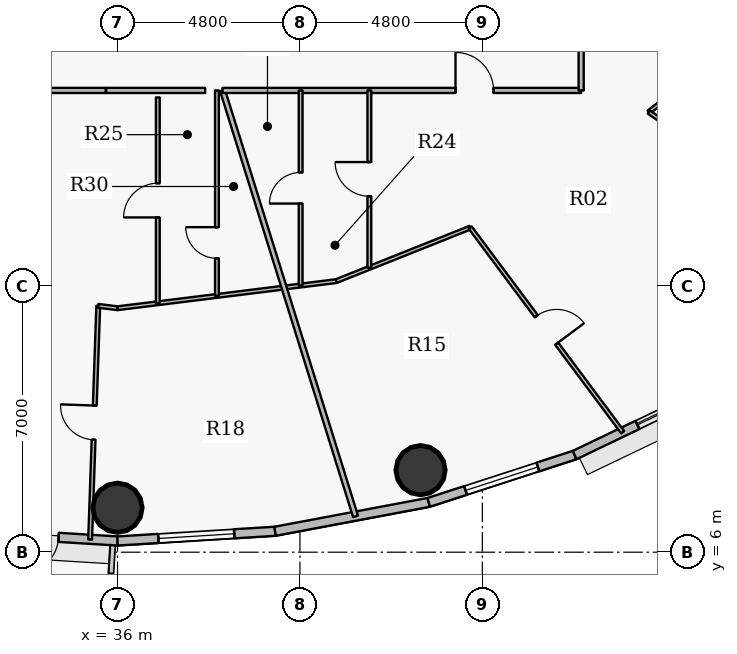
"""IFC4 building model, lengths in metres.
Left out: names, types, materials, properties, quantities, classifications, styles, units other than length and angle.
Written with IfcOpenShell. Run it as: python <this file> out.ifc"""

import sys

from ifc_helpers import new_model, si_unit, direction, frame, frame_2d, origin, origin_2d, place, context, subcontext, project, spatial, rectangle, hollow_circle, extrude, source, transform, mapped, element, fill, save


model = new_model("IFC4")
c1 = context("Model", 3, precision=1e-05, world=origin(), true_north=direction((0.0, 1.0)))
c2 = subcontext(c1, "Body", "Model", "MODEL_VIEW")
j1 = project(units=[si_unit("LENGTHUNIT", "METRE"), si_unit("PLANEANGLEUNIT", "RADIAN")], contexts=[c1])
p1 = place(None, origin())
s1 = spatial("IfcSite", under=j1, at=p1, CompositionType="ELEMENT")
p2 = place(p1, origin())
s2 = spatial("IfcBuilding", under=s1, at=p2, CompositionType="ELEMENT")
p3 = place(p2, frame((0.0, 0.0, 178.65)))
s3 = spatial("IfcBuildingStorey", under=s2, at=p3, CompositionType="ELEMENT", Elevation=178.65)
for number, where, z_axis, x_axis in (
    (1, (36.0, 7.17, 0.0), (0.0, 0.0, 1.0), (1.0, 0.0, 0.0)),
    (2, (43.973, 8.159, 0.0), (0.0, 0.0, 1.0), (1.0, 0.0, 0.0)),
):
    element("IfcColumn", number, at=place(p3, frame(where, z_axis=z_axis, x_axis=x_axis)), inside=s3, PredefinedType="COLUMN", context=c2, shape_type="SweptSolid", body=[
        extrude(hollow_circle(Radius=0.65, WallThickness=0.04, at=origin_2d()), origin(), (0.0, 0.0, 1.0), 3.75),
    ])
p4 = place(p3, frame((36.0, 6.295, 0.0), z_axis=(0.0, 0.0, 1.0), x_axis=(-0.998104600619, 0.061540281305, 0.0)))
e3 = element("IfcWall", 3, at=p4, inside=s3, PredefinedType="SOLIDWALL", context=c2, shape_type="SweptSolid", body=[
    extrude(rectangle(XDim=4.154, YDim=0.24, at=frame_2d((2.077, 0.0))), origin(), (0.0, 0.0, 1.0), 3.5),
])
p5 = place(p4, frame((1.552, 0.0, 0.0)))
e4 = element("IfcOpeningElement", 4, at=p5, cuts=e3, PredefinedType="OPENING", context=c2, shape_type="SweptSolid", body=[
    extrude(rectangle(XDim=1.05, YDim=2.15, at=origin_2d()), frame((0.525, 0.13, 1.075), z_axis=(0.0, -1.0, 0.0), x_axis=(1.0, 0.0, 0.0)), (0.0, 0.0, 1.0), 0.26),
])
p6 = place(p3, frame((40.146, 6.551, 0.0), z_axis=(0.0, 0.0, 1.0), x_axis=(-0.998104600619, -0.061540281305, 0.0)))
e5 = element("IfcWall", 5, at=p6, inside=s3, PredefinedType="SOLIDWALL", context=c2, shape_type="SweptSolid", body=[
    extrude(rectangle(XDim=4.154, YDim=0.24, at=frame_2d((2.077, 0.0))), origin(), (0.0, 0.0, 1.0), 3.5),
])
p7 = place(p6, frame((1.077, 0.0, 0.9)))
e6 = element("IfcOpeningElement", 6, at=p7, cuts=e5, PredefinedType="OPENING", context=c2, shape_type="SweptSolid", body=[
    extrude(rectangle(XDim=2.0, YDim=1.75, at=origin_2d()), frame((1.0, 0.13, 0.875), z_axis=(0.0, -1.0, 0.0), x_axis=(1.0, 0.0, 0.0)), (0.0, 0.0, 1.0), 0.26),
])
p8 = place(p3, frame((44.189, 7.311, 0.0), z_axis=(0.0, 0.0, 1.0), x_axis=(-0.982788108205, -0.184736391573, 0.0)))
e7 = element("IfcWall", 7, at=p8, inside=s3, PredefinedType="SOLIDWALL", context=c2, shape_type="SweptSolid", body=[
    extrude(rectangle(XDim=4.114, YDim=0.24, at=frame_2d((2.057, 0.0))), origin(), (0.0, 0.0, 1.0), 3.5),
])
p9 = place(p3, frame((48.03, 8.556, 0.0), z_axis=(0.0, 0.0, 1.0), x_axis=(-0.951209870236, -0.30854462038, 0.0)))
e8 = element("IfcWall", 8, at=p9, inside=s3, PredefinedType="SOLIDWALL", context=c2, shape_type="SweptSolid", body=[
    extrude(rectangle(XDim=4.038, YDim=0.24, at=frame_2d((2.019, 0.0))), origin(), (0.0, 0.0, 1.0), 3.5),
])
p10 = place(p9, frame((1.019, 0.0, 0.9)))
e9 = element("IfcOpeningElement", 9, at=p10, cuts=e8, PredefinedType="OPENING", context=c2, shape_type="SweptSolid", body=[
    extrude(rectangle(XDim=2.0, YDim=1.75, at=origin_2d()), frame((1.0, 0.13, 0.875), z_axis=(0.0, -1.0, 0.0), x_axis=(1.0, 0.0, 0.0)), (0.0, 0.0, 1.0), 0.26),
])
p11 = place(p3, frame((51.573, 10.257, 0.0), z_axis=(0.0, 0.0, 1.0), x_axis=(-0.901564733809, -0.432644231155, 0.0)))
e10 = element("IfcWall", 10, at=p11, inside=s3, PredefinedType="SOLIDWALL", context=c2, shape_type="SweptSolid", body=[
    extrude(rectangle(XDim=3.93, YDim=0.24, at=frame_2d((1.965, 0.0))), origin(), (0.0, 0.0, 1.0), 3.5),
])
p12 = place(p11, frame((0.848, 0.0, 0.9)))
e11 = element("IfcOpeningElement", 11, at=p12, cuts=e10, PredefinedType="OPENING", context=c2, shape_type="SweptSolid", body=[
    extrude(rectangle(XDim=1.25, YDim=1.65, at=origin_2d()), frame((0.625, 0.13, 0.825), z_axis=(0.0, -1.0, 0.0), x_axis=(1.0, 0.0, 0.0)), (0.0, 0.0, 1.0), 0.26),
])
p13 = place(p3, frame((24.35, 18.15, 0.0), z_axis=(0.0, 0.0, 1.0), x_axis=(1.0, 0.0, 0.0)))
e12 = element("IfcWall", 12, at=p13, inside=s3, PredefinedType="PARTITIONING", context=c2, shape_type="SweptSolid", body=[
    extrude(rectangle(XDim=11.341, YDim=0.135, at=frame_2d((5.67, 0.0))), origin(), (0.0, 0.0, 1.0), 2.935),
])
p14 = place(p13, frame((7.171, 0.0, 0.0)))
e13 = element("IfcOpeningElement", 13, at=p14, cuts=e12, PredefinedType="OPENING", context=c2, shape_type="SweptSolid", body=[
    extrude(rectangle(XDim=1.0, YDim=2.15, at=origin_2d()), frame((0.5, 0.078, 1.075), z_axis=(0.0, -1.0, 0.0), x_axis=(1.0, 0.0, 0.0)), (0.0, 0.0, 1.0), 0.155),
])
p15 = place(p3, frame((35.278, 6.334, 0.0), z_axis=(0.0, 0.0, 1.0), x_axis=(0.034887406989, 0.999391249128, 0.0)))
e14 = element("IfcWall", 14, at=p15, inside=s3, PredefinedType="PARTITIONING", context=c2, shape_type="SweptSolid", body=[
    extrude(rectangle(XDim=6.151, YDim=0.1, at=frame_2d((3.076, 0.0))), origin(), (0.0, 0.0, 1.0), 2.935),
])
p16 = place(p15, frame((2.625, 0.0, 0.0)))
e15 = element("IfcOpeningElement", 15, at=p16, cuts=e14, PredefinedType="OPENING", context=c2, shape_type="SweptSolid", body=[
    extrude(rectangle(XDim=0.9, YDim=2.1, at=origin_2d()), frame((0.45, 0.06, 1.05), z_axis=(0.0, -1.0, 0.0), x_axis=(1.0, 0.0, 0.0)), (0.0, 0.0, 1.0), 0.12),
])
p17 = place(p3, frame((35.493, 12.482, 0.0), z_axis=(0.0, 0.0, 1.0), x_axis=(0.992373140554, -0.123270231229, 0.0)))
e16 = element("IfcWall", 16, at=p17, inside=s3, PredefinedType="PARTITIONING", context=c2, shape_type="SweptSolid", body=[
    extrude(rectangle(XDim=0.511, YDim=0.1, at=frame_2d((0.255, 0.0))), origin(), (0.0, 0.0, 1.0), 2.935),
])
p18 = place(p3, frame((36.0, 12.419, 0.0), z_axis=(0.0, 0.0, 1.0), x_axis=(0.992396615981, 0.123081097612, 0.0)))
e17 = element("IfcWall", 17, at=p18, inside=s3, PredefinedType="PARTITIONING", context=c2, shape_type="SweptSolid", body=[
    extrude(rectangle(XDim=5.798, YDim=0.1, at=frame_2d((2.899, 0.0))), origin(), (0.0, 0.0, 1.0), 2.935),
])
p19 = place(p3, frame((37.061, 12.551, 0.0), z_axis=(0.0, 0.0, 1.0), x_axis=(0.0, 1.0, 0.0)))
e18 = element("IfcWall", 18, at=p19, inside=s3, PredefinedType="PARTITIONING", context=c2, shape_type="SweptSolid", body=[
    extrude(rectangle(XDim=5.416, YDim=0.1, at=frame_2d((2.708, 0.0))), origin(), (0.0, 0.0, 1.0), 3.035),
])
p20 = place(p19, frame((2.258, 0.0, 0.0)))
e19 = element("IfcOpeningElement", 19, at=p20, cuts=e18, PredefinedType="OPENING", context=c2, shape_type="SweptSolid", body=[
    extrude(rectangle(XDim=0.9, YDim=2.1, at=origin_2d()), frame((0.45, 0.06, 1.05), z_axis=(0.0, -1.0, 0.0), x_axis=(1.0, 0.0, 0.0)), (0.0, 0.0, 1.0), 0.12),
])
p21 = place(p3, frame((38.616, 12.743, 0.0), z_axis=(0.0, 0.0, 1.0), x_axis=(0.0, 1.0, 0.0)))
e20 = element("IfcWall", 20, at=p21, inside=s3, PredefinedType="PARTITIONING", context=c2, shape_type="SweptSolid", body=[
    extrude(rectangle(XDim=5.406, YDim=0.1, at=frame_2d((2.703, 0.0))), origin(), (0.0, 0.0, 1.0), 3.035),
])
p22 = place(p21, frame((0.989, 0.0, 0.0)))
e21 = element("IfcOpeningElement", 21, at=p22, cuts=e20, PredefinedType="OPENING", context=c2, shape_type="SweptSolid", body=[
    extrude(rectangle(XDim=0.82, YDim=2.1, at=origin_2d()), frame((0.41, 0.06, 1.05), z_axis=(0.0, -1.0, 0.0), x_axis=(1.0, 0.0, 0.0)), (0.0, 0.0, 1.0), 0.12),
])
p23 = place(p3, frame((38.764, 18.15, 0.0), z_axis=(0.0, 0.0, 1.0), x_axis=(0.298084348379, -0.954539533624, 0.0)))
e22 = element("IfcWall", 22, at=p23, inside=s3, PredefinedType="PARTITIONING", context=c2, shape_type="SweptSolid", body=[
    extrude(rectangle(XDim=11.74, YDim=0.135, at=frame_2d((5.87, 0.0))), origin(), (0.0, 0.0, 1.0), 2.935),
])
p24 = place(p3, frame((38.764, 18.15, 0.0), z_axis=(0.0, 0.0, 1.0), x_axis=(1.0, 0.0, 0.0)))
e23 = element("IfcWall", 23, at=p24, inside=s3, PredefinedType="PARTITIONING", context=c2, shape_type="SweptSolid", body=[
    extrude(rectangle(XDim=9.436, YDim=0.135, at=frame_2d((4.718, 0.0))), origin(), (0.0, 0.0, 1.0), 2.935),
])
p25 = place(p24, frame((6.13, 0.0, 0.0)))
e24 = element("IfcOpeningElement", 24, at=p25, cuts=e23, PredefinedType="OPENING", context=c2, shape_type="SweptSolid", body=[
    extrude(rectangle(XDim=1.0, YDim=2.15, at=origin_2d()), frame((0.5, 0.078, 1.075), z_axis=(0.0, -1.0, 0.0), x_axis=(1.0, 0.0, 0.0)), (0.0, 0.0, 1.0), 0.155),
])
p26 = place(p3, frame((40.819, 13.017, 0.0), z_axis=(0.0, 0.0, 1.0), x_axis=(0.0, 1.0, 0.0)))
e25 = element("IfcWall", 25, at=p26, inside=s3, PredefinedType="PARTITIONING", context=c2, shape_type="SweptSolid", body=[
    extrude(rectangle(XDim=5.133, YDim=0.1, at=frame_2d((2.567, 0.0))), origin(), (0.0, 0.0, 1.0), 2.935),
])
p27 = place(p26, frame((2.157, 0.0, 0.0)))
e26 = element("IfcOpeningElement", 26, at=p27, cuts=e25, PredefinedType="OPENING", context=c2, shape_type="SweptSolid", body=[
    extrude(rectangle(XDim=0.82, YDim=2.1, at=origin_2d()), frame((0.41, 0.06, 1.05), z_axis=(0.0, -1.0, 0.0), x_axis=(1.0, 0.0, 0.0)), (0.0, 0.0, 1.0), 0.12),
])
p28 = place(p3, frame((41.754, 13.133, 0.0), z_axis=(0.0, 0.0, 1.0), x_axis=(0.928786664236, 0.370614803182, 0.0)))
e27 = element("IfcWall", 27, at=p28, inside=s3, PredefinedType="PARTITIONING", context=c2, shape_type="SweptSolid", body=[
    extrude(rectangle(XDim=3.798, YDim=0.1, at=frame_2d((1.899, 0.0))), origin(), (0.0, 0.0, 1.0), 2.935),
])
p29 = place(p3, frame((42.627, 13.481, 0.0), z_axis=(0.0, 0.0, 1.0), x_axis=(0.0, 1.0, 0.0)))
e28 = element("IfcWall", 28, at=p29, inside=s3, PredefinedType="PARTITIONING", context=c2, shape_type="SweptSolid", body=[
    extrude(rectangle(XDim=4.669, YDim=0.1, at=frame_2d((2.334, 0.0))), origin(), (0.0, 0.0, 1.0), 3.5),
])
p30 = place(p29, frame((1.885, 0.0, 0.0)))
e29 = element("IfcOpeningElement", 29, at=p30, cuts=e28, PredefinedType="OPENING", context=c2, shape_type="SweptSolid", body=[
    extrude(rectangle(XDim=0.9, YDim=2.1, at=origin_2d()), frame((0.45, 0.06, 1.05), z_axis=(0.0, -1.0, 0.0), x_axis=(1.0, 0.0, 0.0)), (0.0, 0.0, 1.0), 0.12),
])
p31 = place(p3, frame((45.282, 14.54, 0.0), z_axis=(0.0, 0.0, 1.0), x_axis=(0.597407497301, -0.801937829366, 0.0)))
e30 = element("IfcWall", 30, at=p31, inside=s3, PredefinedType="PARTITIONING", context=c2, shape_type="SweptSolid", body=[
    extrude(rectangle(XDim=6.713, YDim=0.1, at=frame_2d((3.356, 0.0))), origin(), (0.0, 0.0, 1.0), 2.935),
])
p32 = place(p31, frame((2.906, 0.0, 0.0)))
e31 = element("IfcOpeningElement", 31, at=p32, cuts=e30, PredefinedType="OPENING", context=c2, shape_type="SweptSolid", body=[
    extrude(rectangle(XDim=0.9, YDim=2.1, at=origin_2d()), frame((0.45, 0.06, 1.05), z_axis=(0.0, -1.0, 0.0), x_axis=(1.0, 0.0, 0.0)), (0.0, 0.0, 1.0), 0.12),
])
p33 = place(p3, frame((48.2, 18.15, 0.0), z_axis=(0.0, 0.0, 1.0), x_axis=(0.0, 1.0, 0.0)))
e32 = element("IfcWall", 32, at=p33, inside=s3, PredefinedType="PARTITIONING", context=c2, shape_type="SweptSolid", body=[
    extrude(rectangle(XDim=1.9, YDim=0.135, at=frame_2d((0.95, 0.0))), origin(), (0.0, 0.0, 1.0), 3.5),
])
p34 = place(p3, frame((49.979, 17.58, 0.0), z_axis=(0.0, 0.0, 1.0), x_axis=(0.787344176355, 0.6165137046, 0.0)))
e33 = element("IfcWall", 33, at=p34, inside=s3, PredefinedType="PARTITIONING", context=c2, shape_type="SweptSolid", body=[
    extrude(rectangle(XDim=1.378, YDim=0.1, at=frame_2d((0.689, 0.0))), origin(), (0.0, 0.0, 1.0), 3.5),
])
p35 = place(p3, frame((49.979, 17.58, 0.0), z_axis=(0.0, 0.0, 1.0), x_axis=(0.829313188428, -0.55878406876, 0.0)))
e34 = element("IfcWall", 34, at=p35, inside=s3, PredefinedType="PARTITIONING", context=c2, shape_type="SweptSolid", body=[
    extrude(rectangle(XDim=7.259, YDim=0.1, at=frame_2d((3.629, 0.0))), origin(), (0.0, 0.0, 1.0), 2.935),
])
p36 = place(p35, frame((3.179, 0.0, 0.0)))
e35 = element("IfcOpeningElement", 35, at=p36, cuts=e34, PredefinedType="OPENING", context=c2, shape_type="SweptSolid", body=[
    extrude(rectangle(XDim=0.9, YDim=2.1, at=origin_2d()), frame((0.45, 0.06, 1.05), z_axis=(0.0, -1.0, 0.0), x_axis=(1.0, 0.0, 0.0)), (0.0, 0.0, 1.0), 0.12),
])
p37 = place(p3, frame((38.306, 18.15, 0.0), z_axis=(0.0, 0.0, 1.0), x_axis=(-1.0, 0.0, 0.0)))
e36 = element("IfcWall", 36, at=p37, inside=s3, PredefinedType="PARTITIONING", context=c2, shape_type="SweptSolid", body=[
    extrude(rectangle(XDim=2.605, YDim=0.135, at=frame_2d((1.302, 0.0))), origin(), (0.0, 0.0, 1.0), 2.935),
])
m1 = source(origin(), c2, "Body", "SweptSolid", [
    extrude(rectangle(XDim=1.05, YDim=2.15, at=origin_2d()), frame((0.525, 0.025, 1.075), z_axis=(0.0, -1.0, 0.0), x_axis=(1.0, 0.0, 0.0)), (0.0, 0.0, 1.0), 0.05),
])
p38 = place(p5, origin())
e37 = element("IfcDoor", 37, at=p38, inside=s3, OperationType="SINGLE_SWING_RIGHT", PredefinedType="DOOR", context=c2, shape_type="MappedRepresentation", body=[
    mapped(m1, transform((0.0, 0.0, 0.0), x_axis=(1.0, 0.0, 0.0), y_axis=(0.0, 1.0, 0.0), z_axis=(0.0, 0.0, 1.0), scale=1.0)),
])
fill(e4, e37)
m2 = source(origin(), c2, "Body", "SweptSolid", [
    extrude(rectangle(XDim=2.0, YDim=1.75, at=origin_2d()), frame((1.0, 0.03, 0.875), z_axis=(0.0, -1.0, 0.0), x_axis=(1.0, 0.0, 0.0)), (0.0, 0.0, 1.0), 0.06),
])
p39 = place(p7, origin())
e38 = element("IfcWindow", 38, at=p39, inside=s3, PartitioningType="DOUBLE_PANEL_VERTICAL", PredefinedType="WINDOW", context=c2, shape_type="MappedRepresentation", body=[
    mapped(m2, transform((0.0, 0.0, 0.0), x_axis=(1.0, 0.0, 0.0), y_axis=(0.0, 1.0, 0.0), z_axis=(0.0, 0.0, 1.0), scale=1.0)),
])
fill(e6, e38)
p40 = place(p10, origin())
e39 = element("IfcWindow", 39, at=p40, inside=s3, PartitioningType="DOUBLE_PANEL_VERTICAL", PredefinedType="WINDOW", context=c2, shape_type="MappedRepresentation", body=[
    mapped(m2, transform((0.0, 0.0, 0.0), x_axis=(1.0, 0.0, 0.0), y_axis=(0.0, 1.0, 0.0), z_axis=(0.0, 0.0, 1.0), scale=1.0)),
])
fill(e9, e39)
m3 = source(origin(), c2, "Body", "SweptSolid", [
    extrude(rectangle(XDim=1.25, YDim=1.65, at=origin_2d()), frame((0.625, 0.03, 0.825), z_axis=(0.0, -1.0, 0.0), x_axis=(1.0, 0.0, 0.0)), (0.0, 0.0, 1.0), 0.06),
])
p41 = place(p12, origin())
e40 = element("IfcWindow", 40, at=p41, inside=s3, PartitioningType="SINGLE_PANEL", PredefinedType="WINDOW", context=c2, shape_type="MappedRepresentation", body=[
    mapped(m3, transform((0.0, 0.0, 0.0), x_axis=(1.0, 0.0, 0.0), y_axis=(0.0, 1.0, 0.0), z_axis=(0.0, 0.0, 1.0), scale=1.0)),
])
fill(e11, e40)
m4 = source(origin(), c2, "Body", "SweptSolid", [
    extrude(rectangle(XDim=0.9, YDim=2.1, at=origin_2d()), frame((0.45, 0.025, 1.05), z_axis=(0.0, -1.0, 0.0), x_axis=(1.0, 0.0, 0.0)), (0.0, 0.0, 1.0), 0.05),
])
p42 = place(p16, origin())
e41 = element("IfcDoor", 41, at=p42, inside=s3, OperationType="SINGLE_SWING_RIGHT", PredefinedType="DOOR", context=c2, shape_type="MappedRepresentation", body=[
    mapped(m4, transform((0.0, 0.0, 0.0), x_axis=(1.0, 0.0, 0.0), y_axis=(0.0, 1.0, 0.0), z_axis=(0.0, 0.0, 1.0), scale=1.0)),
])
fill(e15, e41)
p43 = place(p20, origin())
e42 = element("IfcDoor", 42, at=p43, inside=s3, OperationType="SINGLE_SWING_LEFT", PredefinedType="DOOR", context=c2, shape_type="MappedRepresentation", body=[
    mapped(m4, transform((0.0, 0.0, 0.0), x_axis=(1.0, 0.0, 0.0), y_axis=(0.0, 1.0, 0.0), z_axis=(0.0, 0.0, 1.0), scale=1.0)),
])
fill(e19, e42)
m5 = source(origin(), c2, "Body", "SweptSolid", [
    extrude(rectangle(XDim=0.82, YDim=2.1, at=origin_2d()), frame((0.41, 0.025, 1.05), z_axis=(0.0, -1.0, 0.0), x_axis=(1.0, 0.0, 0.0)), (0.0, 0.0, 1.0), 0.05),
])
p44 = place(p22, origin())
e43 = element("IfcDoor", 43, at=p44, inside=s3, OperationType="SINGLE_SWING_RIGHT", PredefinedType="DOOR", context=c2, shape_type="MappedRepresentation", body=[
    mapped(m5, transform((0.0, 0.0, 0.0), x_axis=(1.0, 0.0, 0.0), y_axis=(0.0, 1.0, 0.0), z_axis=(0.0, 0.0, 1.0), scale=1.0)),
])
fill(e21, e43)
m6 = source(origin(), c2, "Body", "SweptSolid", [
    extrude(rectangle(XDim=1.0, YDim=2.15, at=origin_2d()), frame((0.5, 0.025, 1.075), z_axis=(0.0, -1.0, 0.0), x_axis=(1.0, 0.0, 0.0)), (0.0, 0.0, 1.0), 0.05),
])
p45 = place(p25, origin())
e44 = element("IfcDoor", 44, at=p45, inside=s3, OperationType="SINGLE_SWING_LEFT", PredefinedType="DOOR", context=c2, shape_type="MappedRepresentation", body=[
    mapped(m6, transform((0.0, 0.0, 0.0), x_axis=(1.0, 0.0, 0.0), y_axis=(0.0, 1.0, 0.0), z_axis=(0.0, 0.0, 1.0), scale=1.0)),
])
fill(e24, e44)
p46 = place(p32, origin())
e45 = element("IfcDoor", 45, at=p46, inside=s3, OperationType="SINGLE_SWING_RIGHT", PredefinedType="DOOR", context=c2, shape_type="MappedRepresentation", body=[
    mapped(m4, transform((0.0, 0.0, 0.0), x_axis=(1.0, 0.0, 0.0), y_axis=(0.0, 1.0, 0.0), z_axis=(0.0, 0.0, 1.0), scale=1.0)),
])
fill(e31, e45)
p47 = place(p30, origin())
e46 = element("IfcDoor", 46, at=p47, inside=s3, OperationType="SINGLE_SWING_RIGHT", PredefinedType="DOOR", context=c2, shape_type="MappedRepresentation", body=[
    mapped(m4, transform((0.0, 0.0, 0.0), x_axis=(1.0, 0.0, 0.0), y_axis=(0.0, 1.0, 0.0), z_axis=(0.0, 0.0, 1.0), scale=1.0)),
])
fill(e29, e46)
p48 = place(p27, origin())
e47 = element("IfcDoor", 47, at=p48, inside=s3, OperationType="SINGLE_SWING_LEFT", PredefinedType="DOOR", context=c2, shape_type="MappedRepresentation", body=[
    mapped(m5, transform((0.0, 0.0, 0.0), x_axis=(1.0, 0.0, 0.0), y_axis=(0.0, 1.0, 0.0), z_axis=(0.0, 0.0, 1.0), scale=1.0)),
])
fill(e26, e47)
save(model, sys.argv[1])
